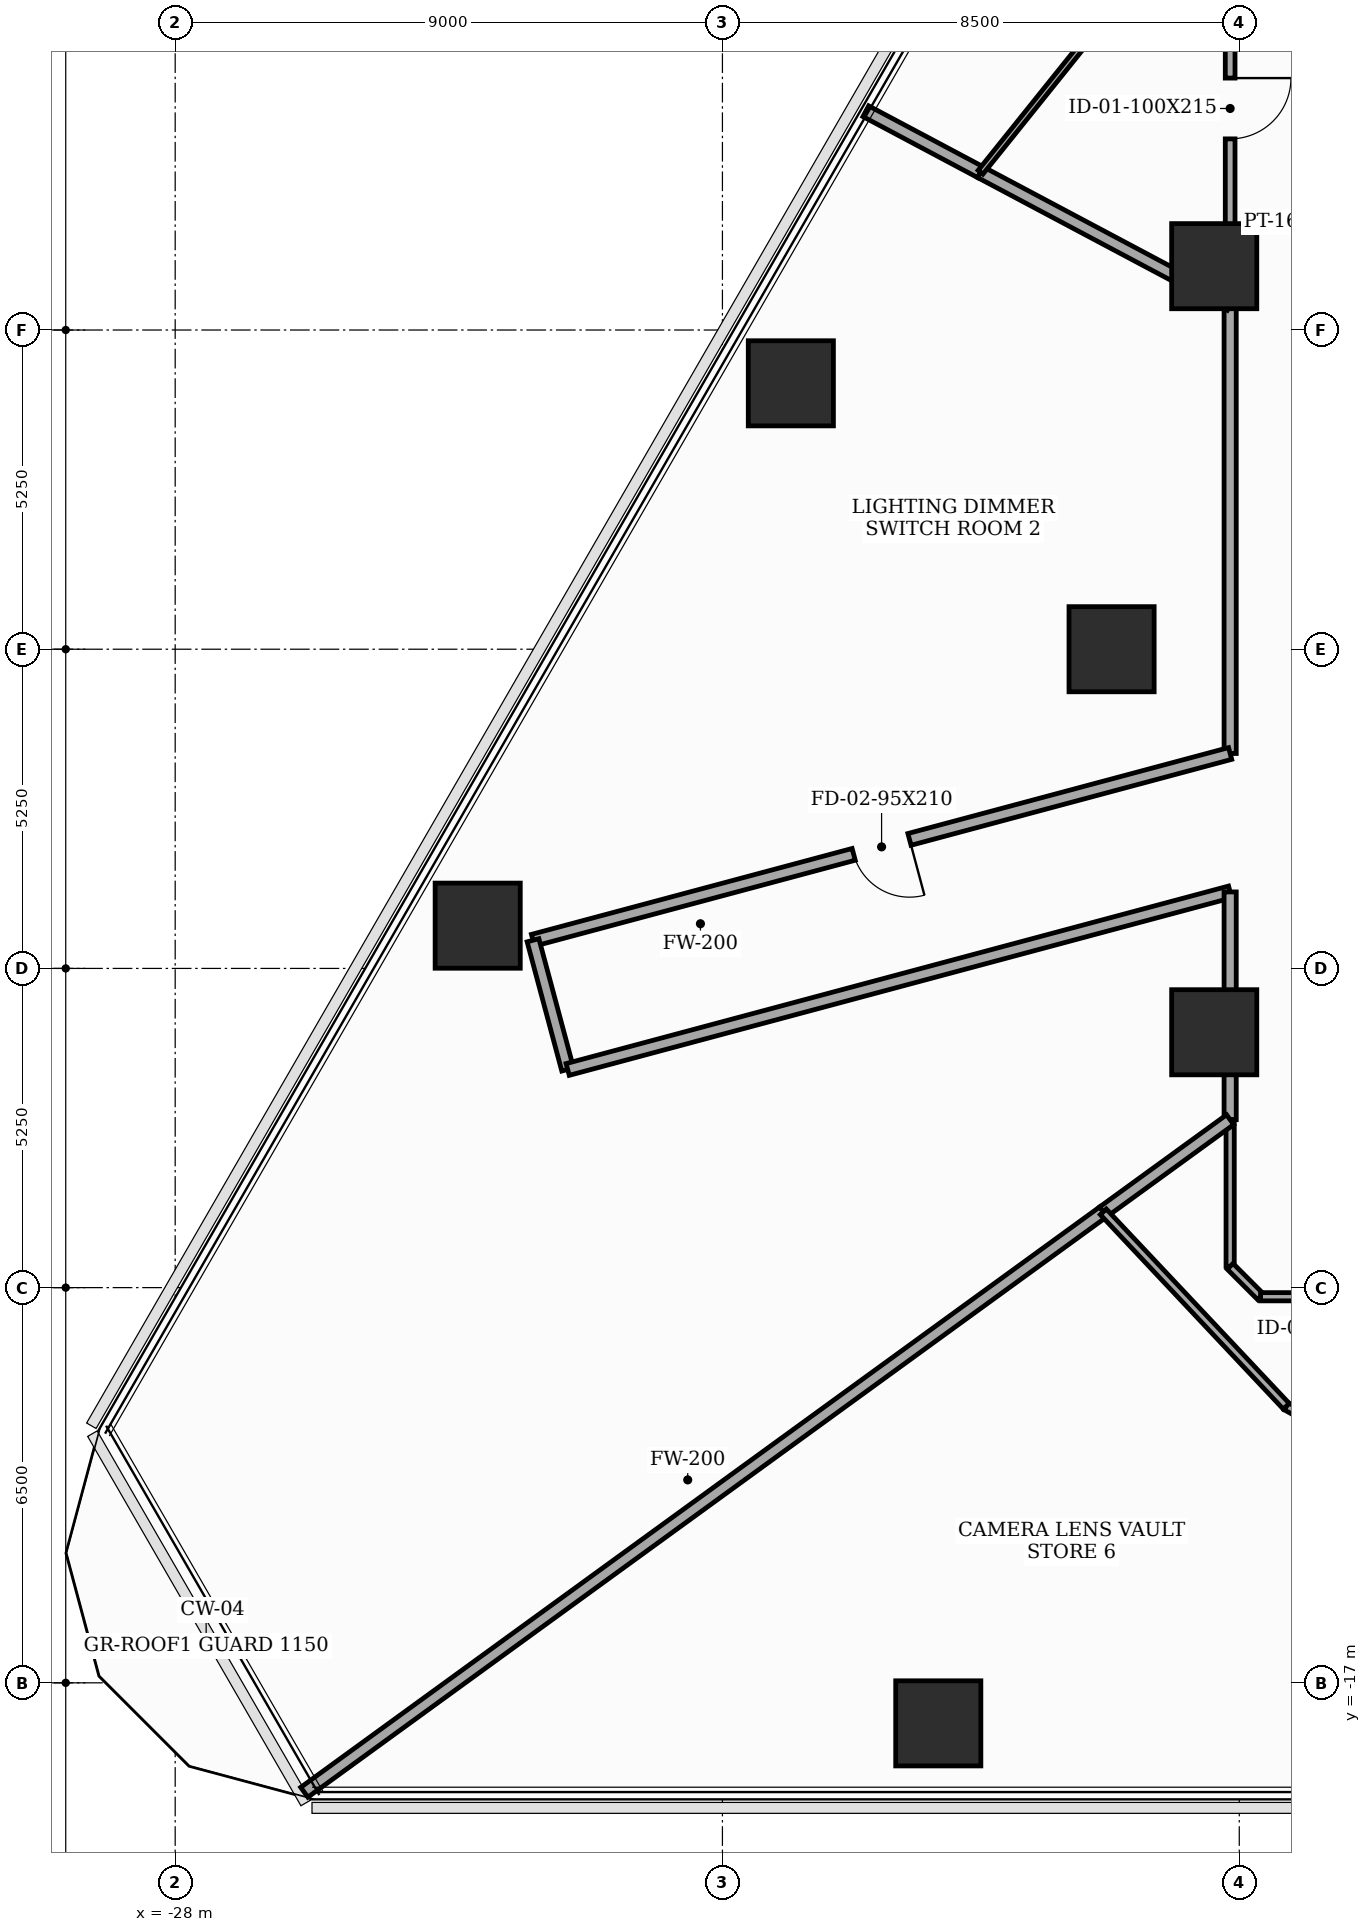
"""IFC4 building model, lengths in metres.
Left out: names, types, materials, properties, quantities, classifications, styles, units other than length and angle.
Written with IfcOpenShell. Run it as: python <this file> out.ifc"""

import sys

from ifc_helpers import new_model, si_unit, direction, frame, frame_2d, origin, origin_2d, place, context, subcontext, project, spatial, rectangle, extrude, element, fill, save


model = new_model("IFC4")
c1 = context("Model", 3, precision=1e-05, world=origin(), true_north=direction((0.0, 1.0)))
c2 = subcontext(c1, "Body", "Model", "MODEL_VIEW")
j1 = project(units=[si_unit("LENGTHUNIT", "METRE"), si_unit("PLANEANGLEUNIT", "RADIAN")], contexts=[c1])
p1 = place(None, origin())
s1 = spatial("IfcSite", under=j1, at=p1, CompositionType="ELEMENT")
p2 = place(p1, origin())
s2 = spatial("IfcBuilding", under=s1, at=p2, CompositionType="ELEMENT")
p3 = place(p2, frame((0.0, 0.0, 40.8)))
s3 = spatial("IfcBuildingStorey", under=s2, at=p3, CompositionType="ELEMENT", Elevation=40.8)
for number, where, z_axis, x_axis in (
    (1, (-10.912, 6.3, 0.0), (0.0, 0.0, 1.0), (1.0, 0.0, 0.0)),
    (2, (-12.6, 0.0, 0.0), (0.0, 0.0, 1.0), (1.0, 0.0, 0.0)),
    (3, (-10.912, -6.3, 0.0), (0.0, 0.0, 1.0), (1.0, 0.0, 0.0)),
    (4, (-15.45, -17.667, 0.0), (0.0, 0.0, 1.0), (1.0, 0.0, 0.0)),
    (5, (-17.875, 4.373, 0.0), (0.0, 0.0, 1.0), (1.0, 0.0, 0.0)),
    (6, (-23.025, -4.547, 0.0), (0.0, 0.0, 1.0), (1.0, 0.0, 0.0)),
):
    element("IfcColumn", number, at=place(p3, frame(where, z_axis=z_axis, x_axis=x_axis)), inside=s3, PredefinedType="COLUMN", context=c2, shape_type="SweptSolid", body=[
        extrude(rectangle(XDim=1.4, YDim=1.4, at=origin_2d()), origin(), (0.0, 0.0, 1.0), 3.7),
    ])
p4 = place(p3, frame((-10.65, 5.663, 0.0), z_axis=(0.0, 0.0, 1.0), x_axis=(0.0, -1.0, 0.0)))
e7 = element("IfcWall", 7, at=p4, inside=s3, PredefinedType="SOLIDWALL", context=c2, shape_type="SweptSolid", body=[
    extrude(rectangle(XDim=7.378, YDim=0.2, at=frame_2d((3.689, 0.0))), origin(), (0.0, 0.0, 1.0), 2.785),
])
p5 = place(p3, frame((-10.65, -1.715, 0.0), z_axis=(0.0, 0.0, 1.0), x_axis=(-0.965926659449, -0.258815935688, 0.0)))
e8 = element("IfcWall", 8, at=p5, inside=s3, PredefinedType="SOLIDWALL", context=c2, shape_type="SweptSolid", body=[
    extrude(rectangle(XDim=11.87, YDim=0.2, at=frame_2d((5.935, 0.0))), origin(), (0.0, 0.0, 1.0), 2.785),
])
p6 = place(p5, frame((5.46, 0.0, 0.0)))
e9 = element("IfcOpeningElement", 9, at=p6, cuts=e8, PredefinedType="OPENING", context=c2, shape_type="SweptSolid", body=[
    extrude(rectangle(XDim=0.95, YDim=2.1, at=frame_2d((0.475, 1.05))), frame((0.0, 0.11, 0.0), z_axis=(0.0, -1.0, 0.0), x_axis=(1.0, 0.0, 0.0)), (0.0, 0.0, 1.0), 0.22),
])
p7 = place(p3, frame((-22.115, -4.787, 0.0), z_axis=(0.0, 0.0, 1.0), x_axis=(0.259105843213, -0.965848933329, 0.0)))
e10 = element("IfcWall", 10, at=p7, inside=s3, PredefinedType="SOLIDWALL", context=c2, shape_type="SweptSolid", body=[
    extrude(rectangle(XDim=2.2, YDim=0.2, at=frame_2d((1.1, 0.0))), origin(), (0.0, 0.0, 1.0), 2.935),
])
p8 = place(p3, frame((-21.545, -6.912, 0.0), z_axis=(0.0, 0.0, 1.0), x_axis=(0.965906888357, 0.258889712088, 0.0)))
e11 = element("IfcWall", 11, at=p8, inside=s3, PredefinedType="SOLIDWALL", context=c2, shape_type="SweptSolid", body=[
    extrude(rectangle(XDim=11.28, YDim=0.2, at=frame_2d((5.64, 0.0))), origin(), (0.0, 0.0, 1.0), 2.785),
])
p9 = place(p3, frame((-10.65, -3.992, 0.0), z_axis=(0.0, 0.0, 1.0), x_axis=(0.0, -1.0, 0.0)))
e12 = element("IfcWall", 12, at=p9, inside=s3, PredefinedType="SOLIDWALL", context=c2, shape_type="SweptSolid", body=[
    extrude(rectangle(XDim=3.746, YDim=0.2, at=frame_2d((1.873, 0.0))), origin(), (0.0, 0.0, 1.0), 2.785),
])
p10 = place(p3, frame((-10.65, -7.738, 0.0), z_axis=(0.0, 0.0, 1.0), x_axis=(0.0, -1.0, 0.0)))
e13 = element("IfcWall", 13, at=p10, inside=s3, PredefinedType="PARTITIONING", context=c2, shape_type="SweptSolid", body=[
    extrude(rectangle(XDim=2.412, YDim=0.135, at=frame_2d((1.206, 0.0))), origin(), (0.0, 0.0, 1.0), 3.5),
])
p11 = place(p3, frame((-10.65, -10.15, 0.0), z_axis=(0.0, 0.0, 1.0), x_axis=(0.707106781187, -0.707106781187, 0.0)))
e14 = element("IfcWall", 14, at=p11, inside=s3, PredefinedType="PARTITIONING", context=c2, shape_type="SweptSolid", body=[
    extrude(rectangle(XDim=0.707, YDim=0.135, at=frame_2d((0.354, 0.0))), origin(), (0.0, 0.0, 1.0), 3.5),
])
p12 = place(p3, frame((-10.15, -10.65, 0.0), z_axis=(0.0, 0.0, 1.0), x_axis=(1.0, 0.0, 0.0)))
e15 = element("IfcWall", 15, at=p12, inside=s3, PredefinedType="PARTITIONING", context=c2, shape_type="SweptSolid", body=[
    extrude(rectangle(XDim=5.3, YDim=0.135, at=frame_2d((2.65, 0.0))), origin(), (0.0, 0.0, 1.0), 2.785),
])
p13 = place(p12, frame((0.585, 0.0, 0.0)))
e16 = element("IfcOpeningElement", 16, at=p13, cuts=e15, PredefinedType="OPENING", context=c2, shape_type="SweptSolid", body=[
    extrude(rectangle(XDim=0.95, YDim=2.1, at=frame_2d((0.475, 1.05))), frame((0.0, 0.077, 0.0), z_axis=(0.0, -1.0, 0.0), x_axis=(1.0, 0.0, 0.0)), (0.0, 0.0, 1.0), 0.155),
])
p14 = place(p3, frame((-10.65, 10.15, 0.0), z_axis=(0.0, 0.0, 1.0), x_axis=(0.0, -1.0, 0.0)))
e17 = element("IfcWall", 17, at=p14, inside=s3, PredefinedType="PARTITIONING", context=c2, shape_type="SweptSolid", body=[
    extrude(rectangle(XDim=4.487, YDim=0.16, at=frame_2d((2.243, 0.0))), origin(), (0.0, 0.0, 1.0), 2.785),
])
p15 = place(p14, frame((0.756, 0.0, 0.0)))
e18 = element("IfcOpeningElement", 18, at=p15, cuts=e17, PredefinedType="OPENING", context=c2, shape_type="SweptSolid", body=[
    extrude(rectangle(XDim=1.0, YDim=2.15, at=frame_2d((0.5, 1.075))), frame((0.0, 0.09, 0.0), z_axis=(0.0, -1.0, 0.0), x_axis=(1.0, 0.0, 0.0)), (0.0, 0.0, 1.0), 0.18),
])
p16 = place(p3, frame((-25.876, -18.8, 0.0), z_axis=(0.0, 0.0, 1.0), x_axis=(0.809014839236, 0.587788218575, 0.0)))
e19 = element("IfcWall", 19, at=p16, inside=s3, PredefinedType="SOLIDWALL", context=c2, shape_type="SweptSolid", body=[
    extrude(rectangle(XDim=16.242, YDim=0.2, at=frame_2d((8.121, 0.0))), origin(), (0.0, 0.0, 1.0), 2.935),
])
p17 = place(p3, frame((-12.736, -9.253, 0.0), z_axis=(0.0, 0.0, 1.0), x_axis=(0.809165833136, 0.587580338749, 0.0)))
e20 = element("IfcWall", 20, at=p17, inside=s3, PredefinedType="SOLIDWALL", context=c2, shape_type="SweptSolid", body=[
    extrude(rectangle(XDim=2.578, YDim=0.2, at=frame_2d((1.289, 0.0))), origin(), (0.0, 0.0, 1.0), 3.5),
])
p18 = place(p3, frame((-14.755, 7.845, 0.0), z_axis=(0.0, 0.0, 1.0), x_axis=(-0.882905636776, 0.469550462197, 0.0)))
e21 = element("IfcWall", 21, at=p18, inside=s3, PredefinedType="SOLIDWALL", context=c2, shape_type="SweptSolid", body=[
    extrude(rectangle(XDim=2.137, YDim=0.2, at=frame_2d((1.069, 0.0))), origin(), (0.0, 0.0, 1.0), 2.935),
])
p19 = place(p3, frame((-10.65, 5.663, 0.0), z_axis=(0.0, 0.0, 1.0), x_axis=(-0.883016425854, 0.46934208385, 0.0)))
e22 = element("IfcWall", 22, at=p19, inside=s3, PredefinedType="SOLIDWALL", context=c2, shape_type="SweptSolid", body=[
    extrude(rectangle(XDim=4.649, YDim=0.2, at=frame_2d((2.324, 0.0))), origin(), (0.0, 0.0, 1.0), 2.785),
])
p20 = place(p3, frame((-5.897, -14.596, 0.0), z_axis=(0.0, 0.0, 1.0), x_axis=(-0.87248894478, 0.488633851915, 0.0)))
e23 = element("IfcWall", 23, at=p20, inside=s3, PredefinedType="PARTITIONING", context=c2, shape_type="SweptSolid", body=[
    extrude(rectangle(XDim=4.39, YDim=0.135, at=frame_2d((2.195, 0.0))), origin(), (0.0, 0.0, 1.0), 2.685),
])
p21 = place(p3, frame((-9.727, -12.451, 0.0), z_axis=(0.0, 0.0, 1.0), x_axis=(-0.685262368975, 0.728296289752, 0.0)))
e24 = element("IfcWall", 24, at=p21, inside=s3, PredefinedType="PARTITIONING", context=c2, shape_type="SweptSolid", body=[
    extrude(rectangle(XDim=4.391, YDim=0.135, at=frame_2d((2.196, 0.0))), origin(), (0.0, 0.0, 1.0), 3.5),
])
p22 = place(p3, frame((-14.755, 7.845, 0.0), z_axis=(0.0, 0.0, 1.0), x_axis=(0.625893000506, 0.779908938222, 0.0)))
e25 = element("IfcWall", 25, at=p22, inside=s3, PredefinedType="MOVABLE", context=c2, shape_type="SweptSolid", body=[
    extrude(rectangle(XDim=6.681, YDim=0.1, at=frame_2d((3.341, 0.0))), origin(), (0.0, 0.0, 1.0), 2.685),
])
p23 = place(p6, origin())
e26 = element("IfcDoor", 26, at=p23, inside=s3, OperationType="SINGLE_SWING_LEFT", PredefinedType="DOOR", context=c2, shape_type="SweptSolid", body=[
    extrude(rectangle(XDim=0.95, YDim=2.1, at=frame_2d((0.475, 1.05))), frame((0.0, 0.025, 0.0), z_axis=(0.0, -1.0, 0.0), x_axis=(1.0, 0.0, 0.0)), (0.0, 0.0, 1.0), 0.05),
])
fill(e9, e26)
p24 = place(p15, origin())
e27 = element("IfcDoor", 27, at=p24, inside=s3, OperationType="SINGLE_SWING_LEFT", PredefinedType="DOOR", context=c2, shape_type="SweptSolid", body=[
    extrude(rectangle(XDim=1.0, YDim=2.15, at=frame_2d((0.5, 1.075))), frame((0.0, 0.025, 0.0), z_axis=(0.0, -1.0, 0.0), x_axis=(1.0, 0.0, 0.0)), (0.0, 0.0, 1.0), 0.05),
])
fill(e18, e27)
save(model, sys.argv[1])
